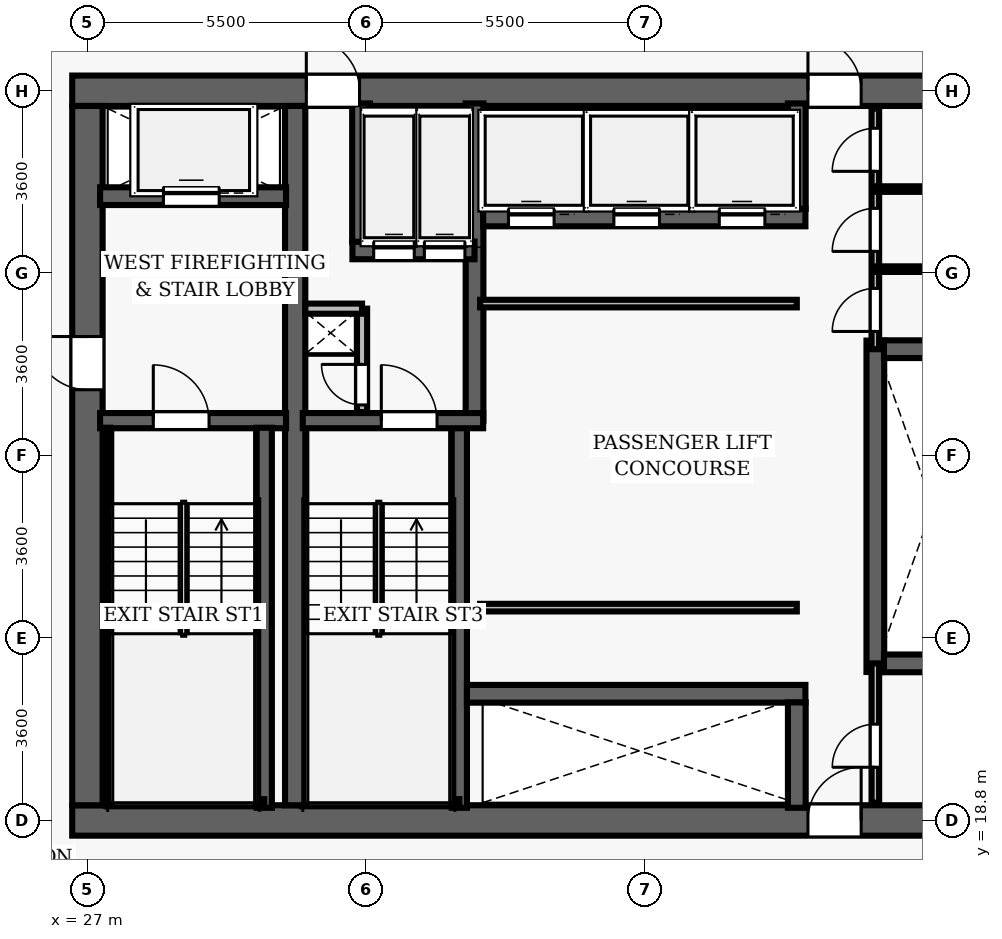
"""IFC4 building model, lengths in metres.
Left out: names, types, materials, properties, quantities, classifications, styles, units other than length and angle.
Written with IfcOpenShell. Run it as: python <this file> out.ifc"""

import sys

from ifc_helpers import new_model, si_unit, direction, frame, frame_2d, origin, place, context, subcontext, project, spatial, rectangle, extrude, element, fill, save


model = new_model("IFC4")
c1 = context("Model", 3, precision=1e-05, world=origin(), true_north=direction((0.0, 1.0)))
c2 = subcontext(c1, "Body", "Model", "MODEL_VIEW")
j1 = project(units=[si_unit("LENGTHUNIT", "METRE"), si_unit("PLANEANGLEUNIT", "RADIAN")], contexts=[c1])
p1 = place(None, origin())
s1 = spatial("IfcSite", under=j1, at=p1, CompositionType="ELEMENT")
p2 = place(p1, origin())
s2 = spatial("IfcBuilding", under=s1, at=p2, CompositionType="ELEMENT")
p3 = place(p2, frame((0.0, 0.0, 76.4)))
s3 = spatial("IfcBuildingStorey", under=s2, at=p3, CompositionType="ELEMENT", Elevation=76.4)
p4 = place(p3, frame((26.7, 18.8, 0.0), z_axis=(0.0, 0.0, 1.0), x_axis=(1.0, 0.0, 0.0)))
e1 = element("IfcWall", 1, at=p4, inside=s3, PredefinedType="SHEAR", context=c2, shape_type="SweptSolid", body=[
    extrude(rectangle(XDim=22.6, YDim=0.6, at=frame_2d((11.3, 0.0))), origin(), (0.0, 0.0, 1.0), 3.5),
])
p5 = place(p4, frame((14.52, 0.0, 0.0)))
e2 = element("IfcOpeningElement", 2, at=p5, cuts=e1, PredefinedType="OPENING", context=c2, shape_type="SweptSolid", body=[
    extrude(rectangle(XDim=1.05, YDim=2.15, at=frame_2d((0.525, 1.075))), frame((0.0, 0.31, 0.0), z_axis=(0.0, -1.0, 0.0), x_axis=(1.0, 0.0, 0.0)), (0.0, 0.0, 1.0), 0.62),
])
p6 = place(p3, frame((26.7, 33.2, 0.0), z_axis=(0.0, 0.0, 1.0), x_axis=(1.0, 0.0, 0.0)))
e3 = element("IfcWall", 3, at=p6, inside=s3, PredefinedType="SHEAR", context=c2, shape_type="SweptSolid", body=[
    extrude(rectangle(XDim=22.6, YDim=0.6, at=frame_2d((11.3, 0.0))), origin(), (0.0, 0.0, 1.0), 3.5),
])
p7 = place(p6, frame((4.62, 0.0, 0.0)))
e4 = element("IfcOpeningElement", 4, at=p7, cuts=e3, PredefinedType="OPENING", context=c2, shape_type="SweptSolid", body=[
    extrude(rectangle(XDim=1.05, YDim=2.15, at=frame_2d((0.525, 1.075))), frame((0.0, 0.31, 0.0), z_axis=(0.0, -1.0, 0.0), x_axis=(1.0, 0.0, 0.0)), (0.0, 0.0, 1.0), 0.62),
])
p8 = place(p6, frame((14.52, 0.0, 0.0)))
e5 = element("IfcOpeningElement", 5, at=p8, cuts=e3, PredefinedType="OPENING", context=c2, shape_type="SweptSolid", body=[
    extrude(rectangle(XDim=1.05, YDim=2.15, at=frame_2d((0.525, 1.075))), frame((0.0, 0.31, 0.0), z_axis=(0.0, -1.0, 0.0), x_axis=(1.0, 0.0, 0.0)), (0.0, 0.0, 1.0), 0.62),
])
p9 = place(p3, frame((27.0, 19.1, 0.0), z_axis=(0.0, 0.0, 1.0), x_axis=(0.0, 1.0, 0.0)))
e6 = element("IfcWall", 6, at=p9, inside=s3, PredefinedType="SHEAR", context=c2, shape_type="SweptSolid", body=[
    extrude(rectangle(XDim=13.8, YDim=0.6, at=frame_2d((6.9, 0.0))), origin(), (0.0, 0.0, 1.0), 3.5),
])
p10 = place(p9, frame((8.2, 0.0, 0.0)))
e7 = element("IfcOpeningElement", 7, at=p10, cuts=e6, PredefinedType="OPENING", context=c2, shape_type="SweptSolid", body=[
    extrude(rectangle(XDim=1.05, YDim=2.15, at=frame_2d((0.525, 1.075))), frame((0.0, 0.31, 0.0), z_axis=(0.0, -1.0, 0.0), x_axis=(1.0, 0.0, 0.0)), (0.0, 0.0, 1.0), 0.62),
])
p11 = place(p3, frame((31.1, 19.1, 0.0), z_axis=(0.0, 0.0, 1.0), x_axis=(0.0, 1.0, 0.0)))
e8 = element("IfcWall", 8, at=p11, inside=s3, PredefinedType="SHEAR", context=c2, shape_type="SweptSolid", body=[
    extrude(rectangle(XDim=13.8, YDim=0.4, at=frame_2d((6.9, 0.0))), origin(), (0.0, 0.0, 1.0), 3.5),
])
p12 = place(p3, frame((27.25, 26.69, 0.0), z_axis=(0.0, 0.0, 1.0), x_axis=(1.0, 0.0, 0.0)))
e9 = element("IfcWall", 9, at=p12, inside=s3, PredefinedType="SHEAR", context=c2, shape_type="SweptSolid", body=[
    extrude(rectangle(XDim=3.67, YDim=0.3, at=frame_2d((1.835, 0.0))), origin(), (0.0, 0.0, 1.0), 3.5),
])
p13 = place(p12, frame((1.05, 0.0, 0.0)))
e10 = element("IfcOpeningElement", 10, at=p13, cuts=e9, PredefinedType="OPENING", context=c2, shape_type="SweptSolid", body=[
    extrude(rectangle(XDim=1.1, YDim=2.15, at=frame_2d((0.55, 1.075))), frame((0.0, 0.16, 0.0), z_axis=(0.0, -1.0, 0.0), x_axis=(1.0, 0.0, 0.0)), (0.0, 0.0, 1.0), 0.32),
])
p14 = place(p3, frame((30.49, 19.05, 0.0), z_axis=(0.0, 0.0, 1.0), x_axis=(0.0, 1.0, 0.0)))
e11 = element("IfcWall", 11, at=p14, inside=s3, PredefinedType="SHEAR", context=c2, shape_type="SweptSolid", body=[
    extrude(rectangle(XDim=7.5, YDim=0.3, at=frame_2d((3.75, 0.0))), origin(), (0.0, 0.0, 1.0), 3.5),
])
p15 = place(p3, frame((27.395, 19.1, 0.0), z_axis=(0.0, 0.0, 1.0), x_axis=(0.0, 1.0, 0.0)))
e12 = element("IfcWall", 12, at=p15, inside=s3, PredefinedType="SHEAR", context=c2, shape_type="SweptSolid", body=[
    extrude(rectangle(XDim=7.45, YDim=0.12, at=frame_2d((3.725, 0.0))), origin(), (0.0, 0.0, 1.0), 3.5),
])
p16 = place(p3, frame((27.395, 19.16, 0.0), z_axis=(0.0, 0.0, 1.0), x_axis=(1.0, 0.0, 0.0)))
e13 = element("IfcWall", 13, at=p16, inside=s3, PredefinedType="SHEAR", context=c2, shape_type="SweptSolid", body=[
    extrude(rectangle(XDim=3.095, YDim=0.12, at=frame_2d((1.547, 0.0))), origin(), (0.0, 0.0, 1.0), 3.5),
])
p17 = place(p3, frame((27.25, 31.12, 0.0), z_axis=(0.0, 0.0, 1.0), x_axis=(1.0, 0.0, 0.0)))
e14 = element("IfcWall", 14, at=p17, inside=s3, PredefinedType="SHEAR", context=c2, shape_type="SweptSolid", body=[
    extrude(rectangle(XDim=3.67, YDim=0.35, at=frame_2d((1.835, 0.0))), origin(), (0.0, 0.0, 1.0), 2.6),
])
p18 = place(p17, frame((1.25, 0.0, 0.0)))
e15 = element("IfcOpeningElement", 15, at=p18, cuts=e14, PredefinedType="OPENING", context=c2, shape_type="SweptSolid", body=[
    extrude(rectangle(XDim=1.1, YDim=2.15, at=frame_2d((0.55, 1.075))), frame((0.0, 0.185, 0.0), z_axis=(0.0, -1.0, 0.0), x_axis=(1.0, 0.0, 0.0)), (0.0, 0.0, 1.0), 0.37),
])
p19 = place(p3, frame((34.34, 19.05, 0.0), z_axis=(0.0, 0.0, 1.0), x_axis=(0.0, 1.0, 0.0)))
e16 = element("IfcWall", 16, at=p19, inside=s3, PredefinedType="SHEAR", context=c2, shape_type="SweptSolid", body=[
    extrude(rectangle(XDim=7.5, YDim=0.3, at=frame_2d((3.75, 0.0))), origin(), (0.0, 0.0, 1.0), 3.5),
])
p20 = place(p3, frame((34.64, 26.69, 0.0), z_axis=(0.0, 0.0, 1.0), x_axis=(0.0, 1.0, 0.0)))
e17 = element("IfcWall", 17, at=p20, inside=s3, PredefinedType="SHEAR", context=c2, shape_type="SweptSolid", body=[
    extrude(rectangle(XDim=6.26, YDim=0.35, at=frame_2d((3.13, 0.0))), origin(), (0.0, 0.0, 1.0), 3.5),
])
p21 = place(p3, frame((31.25, 26.69, 0.0), z_axis=(0.0, 0.0, 1.0), x_axis=(1.0, 0.0, 0.0)))
e18 = element("IfcWall", 18, at=p21, inside=s3, PredefinedType="SHEAR", context=c2, shape_type="SweptSolid", body=[
    extrude(rectangle(XDim=3.56, YDim=0.3, at=frame_2d((1.78, 0.0))), origin(), (0.0, 0.0, 1.0), 3.5),
])
p22 = place(p21, frame((1.55, 0.0, 0.0)))
e19 = element("IfcOpeningElement", 19, at=p22, cuts=e18, PredefinedType="OPENING", context=c2, shape_type="SweptSolid", body=[
    extrude(rectangle(XDim=1.1, YDim=2.15, at=frame_2d((0.55, 1.075))), frame((0.0, 0.16, 0.0), z_axis=(0.0, -1.0, 0.0), x_axis=(1.0, 0.0, 0.0)), (0.0, 0.0, 1.0), 0.32),
])
p23 = place(p3, frame((31.3, 19.16, 0.0), z_axis=(0.0, 0.0, 1.0), x_axis=(1.0, 0.0, 0.0)))
e20 = element("IfcWall", 20, at=p23, inside=s3, PredefinedType="SHEAR", context=c2, shape_type="SweptSolid", body=[
    extrude(rectangle(XDim=3.04, YDim=0.12, at=frame_2d((1.52, 0.0))), origin(), (0.0, 0.0, 1.0), 3.5),
])
p24 = place(p3, frame((32.23, 30.05, 0.0), z_axis=(0.0, 0.0, 1.0), x_axis=(1.0, 0.0, 0.0)))
e21 = element("IfcWall", 21, at=p24, inside=s3, PredefinedType="SHEAR", context=c2, shape_type="SweptSolid", body=[
    extrude(rectangle(XDim=2.41, YDim=0.35, at=frame_2d((1.205, 0.0))), origin(), (0.0, 0.0, 1.0), 2.6),
])
p25 = place(p24, frame((0.42, 0.0, 0.0)))
e22 = element("IfcOpeningElement", 22, at=p25, cuts=e21, PredefinedType="OPENING", context=c2, shape_type="SweptSolid", body=[
    extrude(rectangle(XDim=0.8, YDim=2.15, at=frame_2d((0.4, 1.075))), frame((0.0, 0.185, 0.0), z_axis=(0.0, -1.0, 0.0), x_axis=(1.0, 0.0, 0.0)), (0.0, 0.0, 1.0), 0.37),
])
p26 = place(p24, frame((1.42, 0.0, 0.0)))
e23 = element("IfcOpeningElement", 23, at=p26, cuts=e21, PredefinedType="OPENING", context=c2, shape_type="SweptSolid", body=[
    extrude(rectangle(XDim=0.8, YDim=2.15, at=frame_2d((0.4, 1.075))), frame((0.0, 0.185, 0.0), z_axis=(0.0, -1.0, 0.0), x_axis=(1.0, 0.0, 0.0)), (0.0, 0.0, 1.0), 0.37),
])
p27 = place(p3, frame((32.4, 30.22, 0.0), z_axis=(0.0, 0.0, 1.0), x_axis=(0.0, 1.0, 0.0)))
e24 = element("IfcWall", 24, at=p27, inside=s3, PredefinedType="SHEAR", context=c2, shape_type="SweptSolid", body=[
    extrude(rectangle(XDim=2.73, YDim=0.35, at=frame_2d((1.365, 0.0))), origin(), (0.0, 0.0, 1.0), 2.6),
])
p28 = place(p3, frame((32.42, 26.86, 0.0), z_axis=(0.0, 0.0, 1.0), x_axis=(0.0, 1.0, 0.0)))
e25 = element("IfcWall", 25, at=p28, inside=s3, PredefinedType="PARTITIONING", context=c2, shape_type="SweptSolid", body=[
    extrude(rectangle(XDim=2.04, YDim=0.2, at=frame_2d((1.02, 0.0))), origin(), (0.0, 0.0, 1.0), 2.6),
])
p29 = place(p28, frame((0.14, 0.0, 0.0)))
e26 = element("IfcOpeningElement", 26, at=p29, cuts=e25, PredefinedType="OPENING", context=c2, shape_type="SweptSolid", body=[
    extrude(rectangle(XDim=0.8, YDim=2.05, at=frame_2d((0.4, 1.025))), frame((0.0, 0.11, 0.0), z_axis=(0.0, -1.0, 0.0), x_axis=(1.0, 0.0, 0.0)), (0.0, 0.0, 1.0), 0.22),
])
p30 = place(p3, frame((31.3, 28.9, 0.0), z_axis=(0.0, 0.0, 1.0), x_axis=(1.0, 0.0, 0.0)))
e27 = element("IfcWall", 27, at=p30, inside=s3, PredefinedType="PARTITIONING", context=c2, shape_type="SweptSolid", body=[
    extrude(rectangle(XDim=1.12, YDim=0.2, at=frame_2d((0.56, 0.0))), origin(), (0.0, 0.0, 1.0), 2.6),
])
p31 = place(p3, frame((42.55, 21.73, 0.0), z_axis=(0.0, 0.0, 1.0), x_axis=(0.0, 1.0, 0.0)))
e28 = element("IfcWall", 28, at=p31, inside=s3, PredefinedType="SHEAR", context=c2, shape_type="SweptSolid", body=[
    extrude(rectangle(XDim=6.54, YDim=0.35, at=frame_2d((3.27, 0.0))), origin(), (0.0, 0.0, 1.0), 2.6),
])
for number, where, z_axis, x_axis in (
    (29, (42.72, 21.9, 0.0), (0.0, 0.0, 1.0), (1.0, 0.0, 0.0)),
    (30, (42.72, 28.1, 0.0), (0.0, 0.0, 1.0), (1.0, 0.0, 0.0)),
):
    element("IfcWall", number, at=place(p3, frame(where, z_axis=z_axis, x_axis=x_axis)), inside=s3, PredefinedType="SHEAR", context=c2, shape_type="SweptSolid", body=[
        extrude(rectangle(XDim=2.03, YDim=0.35, at=frame_2d((1.015, 0.0))), origin(), (0.0, 0.0, 1.0), 2.6),
    ])
p32 = place(p3, frame((34.81, 30.7, 0.0), z_axis=(0.0, 0.0, 1.0), x_axis=(1.0, 0.0, 0.0)))
e31 = element("IfcWall", 31, at=p32, inside=s3, PredefinedType="SHEAR", context=c2, shape_type="SweptSolid", body=[
    extrude(rectangle(XDim=6.36, YDim=0.35, at=frame_2d((3.18, 0.0))), origin(), (0.0, 0.0, 1.0), 2.6),
])
p33 = place(p32, frame((0.5, 0.0, 0.0)))
e32 = element("IfcOpeningElement", 32, at=p33, cuts=e31, PredefinedType="OPENING", context=c2, shape_type="SweptSolid", body=[
    extrude(rectangle(XDim=0.9, YDim=2.15, at=frame_2d((0.45, 1.075))), frame((0.0, 0.185, 0.0), z_axis=(0.0, -1.0, 0.0), x_axis=(1.0, 0.0, 0.0)), (0.0, 0.0, 1.0), 0.37),
])
p34 = place(p32, frame((2.58, 0.0, 0.0)))
e33 = element("IfcOpeningElement", 33, at=p34, cuts=e31, PredefinedType="OPENING", context=c2, shape_type="SweptSolid", body=[
    extrude(rectangle(XDim=0.9, YDim=2.15, at=frame_2d((0.45, 1.075))), frame((0.0, 0.185, 0.0), z_axis=(0.0, -1.0, 0.0), x_axis=(1.0, 0.0, 0.0)), (0.0, 0.0, 1.0), 0.37),
])
p35 = place(p32, frame((4.66, 0.0, 0.0)))
e34 = element("IfcOpeningElement", 34, at=p35, cuts=e31, PredefinedType="OPENING", context=c2, shape_type="SweptSolid", body=[
    extrude(rectangle(XDim=0.9, YDim=2.15, at=frame_2d((0.45, 1.075))), frame((0.0, 0.185, 0.0), z_axis=(0.0, -1.0, 0.0), x_axis=(1.0, 0.0, 0.0)), (0.0, 0.0, 1.0), 0.37),
])
p36 = place(p3, frame((41.0, 30.87, 0.0), z_axis=(0.0, 0.0, 1.0), x_axis=(0.0, 1.0, 0.0)))
e35 = element("IfcWall", 35, at=p36, inside=s3, PredefinedType="SHEAR", context=c2, shape_type="SweptSolid", body=[
    extrude(rectangle(XDim=2.08, YDim=0.35, at=frame_2d((1.04, 0.0))), origin(), (0.0, 0.0, 1.0), 2.6),
])
p37 = place(p3, frame((34.49, 21.3, 0.0), z_axis=(0.0, 0.0, 1.0), x_axis=(1.0, 0.0, 0.0)))
e36 = element("IfcWall", 36, at=p37, inside=s3, PredefinedType="SHEAR", context=c2, shape_type="SweptSolid", body=[
    extrude(rectangle(XDim=6.68, YDim=0.35, at=frame_2d((3.34, 0.0))), origin(), (0.0, 0.0, 1.0), 2.6),
])
p38 = place(p3, frame((41.0, 19.05, 0.0), z_axis=(0.0, 0.0, 1.0), x_axis=(0.0, 1.0, 0.0)))
e37 = element("IfcWall", 37, at=p38, inside=s3, PredefinedType="SHEAR", context=c2, shape_type="SweptSolid", body=[
    extrude(rectangle(XDim=2.08, YDim=0.35, at=frame_2d((1.04, 0.0))), origin(), (0.0, 0.0, 1.0), 2.6),
])
for number, where, z_axis, x_axis in (
    (38, (34.75, 29.0, 0.0), (0.0, 0.0, 1.0), (1.0, 0.0, 0.0)),
    (39, (34.75, 23.0, 0.0), (0.0, 0.0, 1.0), (1.0, 0.0, 0.0)),
):
    element("IfcWall", number, at=place(p3, frame(where, z_axis=z_axis, x_axis=x_axis)), inside=s3, PredefinedType="PARTITIONING", context=c2, shape_type="SweptSolid", body=[
        extrude(rectangle(XDim=6.25, YDim=0.15, at=frame_2d((3.125, 0.0))), origin(), (0.0, 0.0, 1.0), 2.6),
    ])
p39 = place(p3, frame((42.55, 28.1, 0.0), z_axis=(0.0, 0.0, 1.0), x_axis=(0.0, 1.0, 0.0)))
e40 = element("IfcWall", 40, at=p39, inside=s3, PredefinedType="PARTITIONING", context=c2, shape_type="SweptSolid", body=[
    extrude(rectangle(XDim=4.75, YDim=0.15, at=frame_2d((2.375, 0.0))), origin(), (0.0, 0.0, 1.0), 2.6),
])
p40 = place(p39, frame((0.35, 0.0, 0.0)))
e41 = element("IfcOpeningElement", 41, at=p40, cuts=e40, PredefinedType="OPENING", context=c2, shape_type="SweptSolid", body=[
    extrude(rectangle(XDim=0.85, YDim=2.1, at=frame_2d((0.425, 1.05))), frame((0.0, 0.085, 0.0), z_axis=(0.0, -1.0, 0.0), x_axis=(1.0, 0.0, 0.0)), (0.0, 0.0, 1.0), 0.17),
])
p41 = place(p39, frame((1.93, 0.0, 0.0)))
e42 = element("IfcOpeningElement", 42, at=p41, cuts=e40, PredefinedType="OPENING", context=c2, shape_type="SweptSolid", body=[
    extrude(rectangle(XDim=0.85, YDim=2.1, at=frame_2d((0.425, 1.05))), frame((0.0, 0.085, 0.0), z_axis=(0.0, -1.0, 0.0), x_axis=(1.0, 0.0, 0.0)), (0.0, 0.0, 1.0), 0.17),
])
p42 = place(p39, frame((3.51, 0.0, 0.0)))
e43 = element("IfcOpeningElement", 43, at=p42, cuts=e40, PredefinedType="OPENING", context=c2, shape_type="SweptSolid", body=[
    extrude(rectangle(XDim=0.85, YDim=2.1, at=frame_2d((0.425, 1.05))), frame((0.0, 0.085, 0.0), z_axis=(0.0, -1.0, 0.0), x_axis=(1.0, 0.0, 0.0)), (0.0, 0.0, 1.0), 0.17),
])
for number, where, z_axis, x_axis in (
    (44, (42.55, 29.68, 0.0), (0.0, 0.0, 1.0), (1.0, 0.0, 0.0)),
    (45, (42.55, 31.26, 0.0), (0.0, 0.0, 1.0), (1.0, 0.0, 0.0)),
):
    element("IfcWall", number, at=place(p3, frame(where, z_axis=z_axis, x_axis=x_axis)), inside=s3, PredefinedType="PARTITIONING", context=c2, shape_type="SweptSolid", body=[
        extrude(rectangle(XDim=2.2, YDim=0.11, at=frame_2d((1.1, 0.0))), origin(), (0.0, 0.0, 1.0), 2.6),
    ])
p43 = place(p3, frame((42.55, 19.15, 0.0), z_axis=(0.0, 0.0, 1.0), x_axis=(0.0, 1.0, 0.0)))
e46 = element("IfcWall", 46, at=p43, inside=s3, PredefinedType="PARTITIONING", context=c2, shape_type="SweptSolid", body=[
    extrude(rectangle(XDim=2.75, YDim=0.15, at=frame_2d((1.375, 0.0))), origin(), (0.0, 0.0, 1.0), 2.6),
])
p44 = place(p43, frame((0.7, 0.0, 0.0)))
e47 = element("IfcOpeningElement", 47, at=p44, cuts=e46, PredefinedType="OPENING", context=c2, shape_type="SweptSolid", body=[
    extrude(rectangle(XDim=0.85, YDim=2.1, at=frame_2d((0.425, 1.05))), frame((0.0, 0.085, 0.0), z_axis=(0.0, -1.0, 0.0), x_axis=(1.0, 0.0, 0.0)), (0.0, 0.0, 1.0), 0.17),
])
p45 = place(p13, origin())
e48 = element("IfcDoor", 48, at=p45, inside=s3, OperationType="SINGLE_SWING_LEFT", PredefinedType="DOOR", context=c2, shape_type="SweptSolid", body=[
    extrude(rectangle(XDim=1.1, YDim=2.15, at=frame_2d((0.55, 1.075))), frame((0.0, 0.025, 0.0), z_axis=(0.0, -1.0, 0.0), x_axis=(1.0, 0.0, 0.0)), (0.0, 0.0, 1.0), 0.05),
])
fill(e10, e48)
p46 = place(p10, origin())
e49 = element("IfcDoor", 49, at=p46, inside=s3, OperationType="SINGLE_SWING_RIGHT", PredefinedType="DOOR", context=c2, shape_type="SweptSolid", body=[
    extrude(rectangle(XDim=1.05, YDim=2.15, at=frame_2d((0.525, 1.075))), frame((0.0, 0.025, 0.0), z_axis=(0.0, -1.0, 0.0), x_axis=(1.0, 0.0, 0.0)), (0.0, 0.0, 1.0), 0.05),
])
fill(e7, e49)
p47 = place(p22, origin())
e50 = element("IfcDoor", 50, at=p47, inside=s3, OperationType="SINGLE_SWING_LEFT", PredefinedType="DOOR", context=c2, shape_type="SweptSolid", body=[
    extrude(rectangle(XDim=1.1, YDim=2.15, at=frame_2d((0.55, 1.075))), frame((0.0, 0.025, 0.0), z_axis=(0.0, -1.0, 0.0), x_axis=(1.0, 0.0, 0.0)), (0.0, 0.0, 1.0), 0.05),
])
fill(e19, e50)
p48 = place(p29, origin())
e51 = element("IfcDoor", 51, at=p48, inside=s3, OperationType="SINGLE_SWING_RIGHT", PredefinedType="DOOR", context=c2, shape_type="SweptSolid", body=[
    extrude(rectangle(XDim=0.8, YDim=2.05, at=frame_2d((0.4, 1.025))), frame((0.0, 0.025, 0.0), z_axis=(0.0, -1.0, 0.0), x_axis=(1.0, 0.0, 0.0)), (0.0, 0.0, 1.0), 0.05),
])
fill(e26, e51)
p49 = place(p7, origin())
e52 = element("IfcDoor", 52, at=p49, inside=s3, OperationType="SINGLE_SWING_LEFT", PredefinedType="DOOR", context=c2, shape_type="SweptSolid", body=[
    extrude(rectangle(XDim=1.05, YDim=2.15, at=frame_2d((0.525, 1.075))), frame((0.0, 0.025, 0.0), z_axis=(0.0, -1.0, 0.0), x_axis=(1.0, 0.0, 0.0)), (0.0, 0.0, 1.0), 0.05),
])
fill(e4, e52)
p50 = place(p8, origin())
e53 = element("IfcDoor", 53, at=p50, inside=s3, OperationType="SINGLE_SWING_LEFT", PredefinedType="DOOR", context=c2, shape_type="SweptSolid", body=[
    extrude(rectangle(XDim=1.05, YDim=2.15, at=frame_2d((0.525, 1.075))), frame((0.0, 0.025, 0.0), z_axis=(0.0, -1.0, 0.0), x_axis=(1.0, 0.0, 0.0)), (0.0, 0.0, 1.0), 0.05),
])
fill(e5, e53)
p51 = place(p5, origin())
e54 = element("IfcDoor", 54, at=p51, inside=s3, OperationType="SINGLE_SWING_RIGHT", PredefinedType="DOOR", context=c2, shape_type="SweptSolid", body=[
    extrude(rectangle(XDim=1.05, YDim=2.15, at=frame_2d((0.525, 1.075))), frame((0.0, 0.025, 0.0), z_axis=(0.0, -1.0, 0.0), x_axis=(1.0, 0.0, 0.0)), (0.0, 0.0, 1.0), 0.05),
])
fill(e2, e54)
p52 = place(p40, origin())
e55 = element("IfcDoor", 55, at=p52, inside=s3, OperationType="SINGLE_SWING_LEFT", PredefinedType="DOOR", context=c2, shape_type="SweptSolid", body=[
    extrude(rectangle(XDim=0.85, YDim=2.1, at=frame_2d((0.425, 1.05))), frame((0.0, 0.025, 0.0), z_axis=(0.0, -1.0, 0.0), x_axis=(1.0, 0.0, 0.0)), (0.0, 0.0, 1.0), 0.05),
])
fill(e41, e55)
p53 = place(p41, origin())
e56 = element("IfcDoor", 56, at=p53, inside=s3, OperationType="SINGLE_SWING_LEFT", PredefinedType="DOOR", context=c2, shape_type="SweptSolid", body=[
    extrude(rectangle(XDim=0.85, YDim=2.1, at=frame_2d((0.425, 1.05))), frame((0.0, 0.025, 0.0), z_axis=(0.0, -1.0, 0.0), x_axis=(1.0, 0.0, 0.0)), (0.0, 0.0, 1.0), 0.05),
])
fill(e42, e56)
p54 = place(p42, origin())
e57 = element("IfcDoor", 57, at=p54, inside=s3, OperationType="SINGLE_SWING_LEFT", PredefinedType="DOOR", context=c2, shape_type="SweptSolid", body=[
    extrude(rectangle(XDim=0.85, YDim=2.1, at=frame_2d((0.425, 1.05))), frame((0.0, 0.025, 0.0), z_axis=(0.0, -1.0, 0.0), x_axis=(1.0, 0.0, 0.0)), (0.0, 0.0, 1.0), 0.05),
])
fill(e43, e57)
p55 = place(p44, origin())
e58 = element("IfcDoor", 58, at=p55, inside=s3, OperationType="SINGLE_SWING_LEFT", PredefinedType="DOOR", context=c2, shape_type="SweptSolid", body=[
    extrude(rectangle(XDim=0.85, YDim=2.1, at=frame_2d((0.425, 1.05))), frame((0.0, 0.025, 0.0), z_axis=(0.0, -1.0, 0.0), x_axis=(1.0, 0.0, 0.0)), (0.0, 0.0, 1.0), 0.05),
])
fill(e47, e58)
p56 = place(p33, origin())
e59 = element("IfcDoor", 59, at=p56, inside=s3, OperationType="SLIDING_TO_LEFT", PredefinedType="DOOR", context=c2, shape_type="SweptSolid", body=[
    extrude(rectangle(XDim=0.9, YDim=2.15, at=frame_2d((0.45, 1.075))), frame((0.0, 0.025, 0.0), z_axis=(0.0, -1.0, 0.0), x_axis=(1.0, 0.0, 0.0)), (0.0, 0.0, 1.0), 0.05),
])
fill(e32, e59)
p57 = place(p34, origin())
e60 = element("IfcDoor", 60, at=p57, inside=s3, OperationType="SLIDING_TO_LEFT", PredefinedType="DOOR", context=c2, shape_type="SweptSolid", body=[
    extrude(rectangle(XDim=0.9, YDim=2.15, at=frame_2d((0.45, 1.075))), frame((0.0, 0.025, 0.0), z_axis=(0.0, -1.0, 0.0), x_axis=(1.0, 0.0, 0.0)), (0.0, 0.0, 1.0), 0.05),
])
fill(e33, e60)
p58 = place(p35, origin())
e61 = element("IfcDoor", 61, at=p58, inside=s3, OperationType="SLIDING_TO_LEFT", PredefinedType="DOOR", context=c2, shape_type="SweptSolid", body=[
    extrude(rectangle(XDim=0.9, YDim=2.15, at=frame_2d((0.45, 1.075))), frame((0.0, 0.025, 0.0), z_axis=(0.0, -1.0, 0.0), x_axis=(1.0, 0.0, 0.0)), (0.0, 0.0, 1.0), 0.05),
])
fill(e34, e61)
p59 = place(p18, origin())
e62 = element("IfcDoor", 62, at=p59, inside=s3, OperationType="SLIDING_TO_LEFT", PredefinedType="DOOR", context=c2, shape_type="SweptSolid", body=[
    extrude(rectangle(XDim=1.1, YDim=2.15, at=frame_2d((0.55, 1.075))), frame((0.0, 0.025, 0.0), z_axis=(0.0, -1.0, 0.0), x_axis=(1.0, 0.0, 0.0)), (0.0, 0.0, 1.0), 0.05),
])
fill(e15, e62)
p60 = place(p25, origin())
e63 = element("IfcDoor", 63, at=p60, inside=s3, OperationType="SLIDING_TO_LEFT", PredefinedType="DOOR", context=c2, shape_type="SweptSolid", body=[
    extrude(rectangle(XDim=0.8, YDim=2.15, at=frame_2d((0.4, 1.075))), frame((0.0, 0.025, 0.0), z_axis=(0.0, -1.0, 0.0), x_axis=(1.0, 0.0, 0.0)), (0.0, 0.0, 1.0), 0.05),
])
fill(e22, e63)
p61 = place(p26, origin())
e64 = element("IfcDoor", 64, at=p61, inside=s3, OperationType="SLIDING_TO_LEFT", PredefinedType="DOOR", context=c2, shape_type="SweptSolid", body=[
    extrude(rectangle(XDim=0.8, YDim=2.15, at=frame_2d((0.4, 1.075))), frame((0.0, 0.025, 0.0), z_axis=(0.0, -1.0, 0.0), x_axis=(1.0, 0.0, 0.0)), (0.0, 0.0, 1.0), 0.05),
])
fill(e23, e64)
save(model, sys.argv[1])
